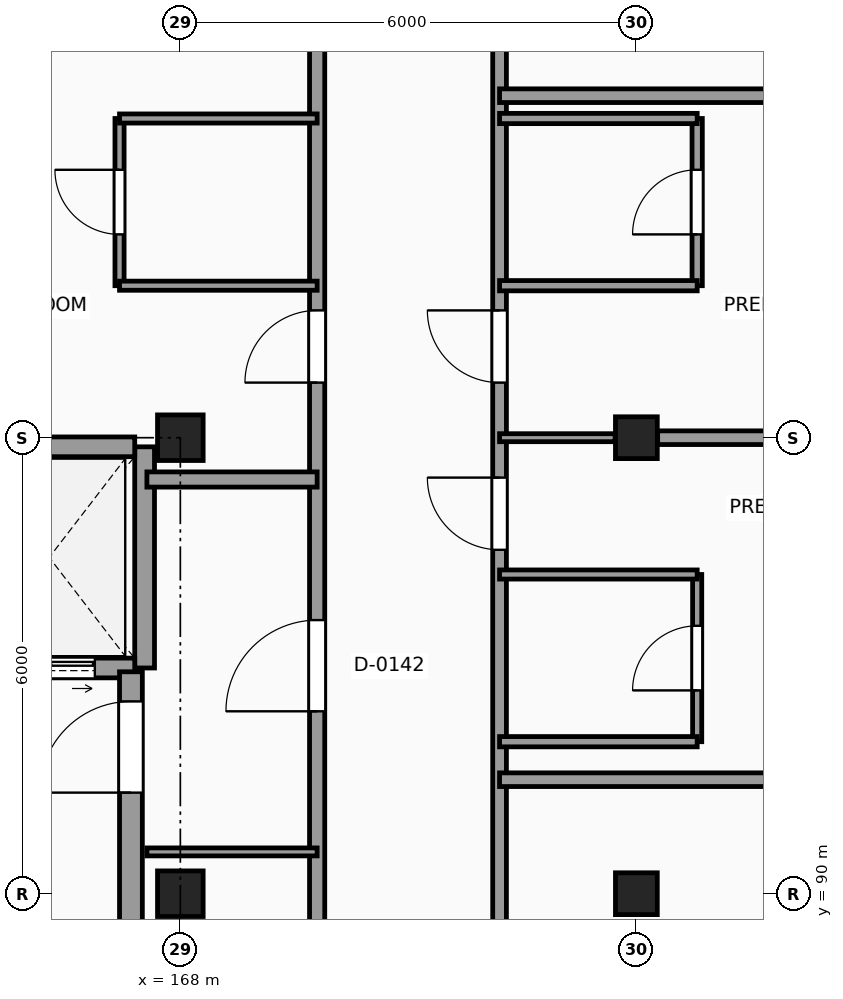
"""IFC4 building model, lengths in metres.
Left out: names, types, materials, properties, quantities, classifications, styles, units other than length and angle.
Written with IfcOpenShell. Run it as: python <this file> out.ifc"""

import sys

from ifc_helpers import new_model, si_unit, direction, frame, frame_2d, origin, origin_2d, place, context, subcontext, project, spatial, rectangle, extrude, element, fill, save


model = new_model("IFC4")
c1 = context("Model", 3, precision=1e-05, world=origin(), true_north=direction((0.0, 1.0)))
c2 = subcontext(c1, "Body", "Model", "MODEL_VIEW")
j1 = project(units=[si_unit("LENGTHUNIT", "METRE"), si_unit("PLANEANGLEUNIT", "RADIAN")], contexts=[c1])
p1 = place(None, origin())
s1 = spatial("IfcSite", under=j1, at=p1, CompositionType="ELEMENT")
p2 = place(p1, origin())
s2 = spatial("IfcBuilding", under=s1, at=p2, CompositionType="ELEMENT")
p3 = place(p2, frame((0.0, 0.0, 24.6)))
s3 = spatial("IfcBuildingStorey", under=s2, at=p3, CompositionType="ELEMENT", Elevation=24.6)
for number, where, z_axis, x_axis in (
    (1, (168.0, 90.0, 0.0), (0.0, 0.0, 1.0), (1.0, 0.0, 0.0)),
    (2, (168.0, 96.0, 0.0), (0.0, 0.0, 1.0), (1.0, 0.0, 0.0)),
):
    element("IfcColumn", number, at=place(p3, frame(where, z_axis=z_axis, x_axis=x_axis)), inside=s3, PredefinedType="COLUMN", context=c2, shape_type="SweptSolid", body=[
        extrude(rectangle(XDim=0.6, YDim=0.6, at=origin_2d()), origin(), (0.0, 0.0, 1.0), 3.6),
    ])
for number, where, z_axis, x_axis in (
    (3, (174.0, 90.0, 0.0), (0.0, 0.0, 1.0), (1.0, 0.0, 0.0)),
    (4, (174.0, 96.0, 0.0), (0.0, 0.0, 1.0), (1.0, 0.0, 0.0)),
):
    element("IfcColumn", number, at=place(p3, frame(where, z_axis=z_axis, x_axis=x_axis)), inside=s3, PredefinedType="COLUMN", context=c2, shape_type="SweptSolid", body=[
        extrude(rectangle(XDim=0.55, YDim=0.55, at=origin_2d()), origin(), (0.0, 0.0, 1.0), 3.6),
    ])
p4 = place(p3, frame((167.53, 92.97, 0.0), z_axis=(0.0, 0.0, 1.0), x_axis=(0.0, 1.0, 0.0)))
e5 = element("IfcWall", 5, at=p4, inside=s3, PredefinedType="SHEAR", context=c2, shape_type="SweptSolid", body=[
    extrude(rectangle(XDim=2.91, YDim=0.26, at=frame_2d((1.455, 0.0))), origin(), (0.0, 0.0, 1.0), 3.6),
])
p5 = place(p3, frame((165.15, 95.88, 0.0), z_axis=(0.0, 0.0, 1.0), x_axis=(1.0, 0.0, 0.0)))
e6 = element("IfcWall", 6, at=p5, inside=s3, PredefinedType="SHEAR", context=c2, shape_type="SweptSolid", body=[
    extrude(rectangle(XDim=2.25, YDim=0.26, at=frame_2d((1.125, 0.0))), origin(), (0.0, 0.0, 1.0), 3.6),
])
p6 = place(p3, frame((165.15, 92.97, 0.0), z_axis=(0.0, 0.0, 1.0), x_axis=(1.0, 0.0, 0.0)))
e7 = element("IfcWall", 7, at=p6, inside=s3, PredefinedType="SHEAR", context=c2, shape_type="SweptSolid", body=[
    extrude(rectangle(XDim=2.25, YDim=0.26, at=frame_2d((1.125, 0.0))), origin(), (0.0, 0.0, 1.0), 3.6),
])
p7 = place(p6, frame((0.525, 0.0, 0.0)))
e8 = element("IfcOpeningElement", 8, at=p7, cuts=e7, PredefinedType="OPENING", context=c2, shape_type="SweptSolid", body=[
    extrude(rectangle(XDim=1.2, YDim=2.25, at=frame_2d((0.6, 1.125))), frame((0.0, 0.14, 0.0), z_axis=(0.0, -1.0, 0.0), x_axis=(1.0, 0.0, 0.0)), (0.0, 0.0, 1.0), 0.28),
])
p8 = place(p3, frame((167.35, 88.68, 0.0), z_axis=(0.0, 0.0, 1.0), x_axis=(0.0, 1.0, 0.0)))
e9 = element("IfcWall", 9, at=p8, inside=s3, PredefinedType="SHEAR", context=c2, shape_type="SweptSolid", body=[
    extrude(rectangle(XDim=4.24, YDim=0.3, at=frame_2d((2.12, 0.0))), origin(), (0.0, 0.0, 1.0), 3.6),
])
p9 = place(p8, frame((2.65, 0.0, 0.0)))
e10 = element("IfcOpeningElement", 10, at=p9, cuts=e9, PredefinedType="OPENING", context=c2, shape_type="SweptSolid", body=[
    extrude(rectangle(XDim=1.2, YDim=2.2, at=frame_2d((0.6, 1.1))), frame((0.0, 0.16, 0.0), z_axis=(0.0, -1.0, 0.0), x_axis=(1.0, 0.0, 0.0)), (0.0, 0.0, 1.0), 0.32),
])
p10 = place(p3, frame((167.2, 98.0, 0.0), z_axis=(0.0, 0.0, 1.0), x_axis=(0.0, 1.0, 0.0)))
e11 = element("IfcWall", 11, at=p10, inside=s3, PredefinedType="PARTITIONING", context=c2, shape_type="SweptSolid", body=[
    extrude(rectangle(XDim=2.2, YDim=0.12, at=frame_2d((1.1, 0.0))), origin(), (0.0, 0.0, 1.0), 3.38),
])
p11 = place(p10, frame((0.675, 0.0, 0.0)))
e12 = element("IfcOpeningElement", 12, at=p11, cuts=e11, PredefinedType="OPENING", context=c2, shape_type="SweptSolid", body=[
    extrude(rectangle(XDim=0.85, YDim=2.1, at=frame_2d((0.425, 1.05))), frame((0.0, 0.07, 0.0), z_axis=(0.0, -1.0, 0.0), x_axis=(1.0, 0.0, 0.0)), (0.0, 0.0, 1.0), 0.14),
])
p12 = place(p3, frame((169.8, 42.215, 0.0), z_axis=(0.0, 0.0, 1.0), x_axis=(0.0, 1.0, 0.0)))
e13 = element("IfcWall", 13, at=p12, inside=s3, PredefinedType="PARTITIONING", context=c2, shape_type="SweptSolid", body=[
    extrude(rectangle(XDim=65.605, YDim=0.2, at=frame_2d((32.802, 0.0))), origin(), (0.0, 0.0, 1.0), 3.38),
])
p13 = place(p12, frame((50.185, 0.0, 0.0)))
e14 = element("IfcOpeningElement", 14, at=p13, cuts=e13, PredefinedType="OPENING", context=c2, shape_type="SweptSolid", body=[
    extrude(rectangle(XDim=1.2, YDim=2.2, at=frame_2d((0.6, 1.1))), frame((0.0, 0.11, 0.0), z_axis=(0.0, -1.0, 0.0), x_axis=(1.0, 0.0, 0.0)), (0.0, 0.0, 1.0), 0.22),
])
p14 = place(p12, frame((0.46, 0.0, 0.0)))
e15 = element("IfcOpeningElement", 15, at=p14, cuts=e13, PredefinedType="OPENING", context=c2, shape_type="SweptSolid", body=[
    extrude(rectangle(XDim=0.95, YDim=2.1, at=frame_2d((0.475, 1.05))), frame((0.0, 0.11, 0.0), z_axis=(0.0, -1.0, 0.0), x_axis=(1.0, 0.0, 0.0)), (0.0, 0.0, 1.0), 0.22),
])
p15 = place(p12, frame((6.51, 0.0, 0.0)))
e16 = element("IfcOpeningElement", 16, at=p15, cuts=e13, PredefinedType="OPENING", context=c2, shape_type="SweptSolid", body=[
    extrude(rectangle(XDim=0.95, YDim=2.1, at=frame_2d((0.475, 1.05))), frame((0.0, 0.11, 0.0), z_axis=(0.0, -1.0, 0.0), x_axis=(1.0, 0.0, 0.0)), (0.0, 0.0, 1.0), 0.22),
])
p16 = place(p12, frame((12.51, 0.0, 0.0)))
e17 = element("IfcOpeningElement", 17, at=p16, cuts=e13, PredefinedType="OPENING", context=c2, shape_type="SweptSolid", body=[
    extrude(rectangle(XDim=0.95, YDim=2.1, at=frame_2d((0.475, 1.05))), frame((0.0, 0.11, 0.0), z_axis=(0.0, -1.0, 0.0), x_axis=(1.0, 0.0, 0.0)), (0.0, 0.0, 1.0), 0.22),
])
p17 = place(p12, frame((18.51, 0.0, 0.0)))
e18 = element("IfcOpeningElement", 18, at=p17, cuts=e13, PredefinedType="OPENING", context=c2, shape_type="SweptSolid", body=[
    extrude(rectangle(XDim=0.95, YDim=2.1, at=frame_2d((0.475, 1.05))), frame((0.0, 0.11, 0.0), z_axis=(0.0, -1.0, 0.0), x_axis=(1.0, 0.0, 0.0)), (0.0, 0.0, 1.0), 0.22),
])
p18 = place(p12, frame((24.51, 0.0, 0.0)))
e19 = element("IfcOpeningElement", 19, at=p18, cuts=e13, PredefinedType="OPENING", context=c2, shape_type="SweptSolid", body=[
    extrude(rectangle(XDim=0.95, YDim=2.1, at=frame_2d((0.475, 1.05))), frame((0.0, 0.11, 0.0), z_axis=(0.0, -1.0, 0.0), x_axis=(1.0, 0.0, 0.0)), (0.0, 0.0, 1.0), 0.22),
])
p19 = place(p12, frame((30.51, 0.0, 0.0)))
e20 = element("IfcOpeningElement", 20, at=p19, cuts=e13, PredefinedType="OPENING", context=c2, shape_type="SweptSolid", body=[
    extrude(rectangle(XDim=0.95, YDim=2.1, at=frame_2d((0.475, 1.05))), frame((0.0, 0.11, 0.0), z_axis=(0.0, -1.0, 0.0), x_axis=(1.0, 0.0, 0.0)), (0.0, 0.0, 1.0), 0.22),
])
p20 = place(p12, frame((54.51, 0.0, 0.0)))
e21 = element("IfcOpeningElement", 21, at=p20, cuts=e13, PredefinedType="OPENING", context=c2, shape_type="SweptSolid", body=[
    extrude(rectangle(XDim=0.95, YDim=2.1, at=frame_2d((0.475, 1.05))), frame((0.0, 0.11, 0.0), z_axis=(0.0, -1.0, 0.0), x_axis=(1.0, 0.0, 0.0)), (0.0, 0.0, 1.0), 0.22),
])
p21 = place(p12, frame((60.51, 0.0, 0.0)))
e22 = element("IfcOpeningElement", 22, at=p21, cuts=e13, PredefinedType="OPENING", context=c2, shape_type="SweptSolid", body=[
    extrude(rectangle(XDim=0.95, YDim=2.1, at=frame_2d((0.475, 1.05))), frame((0.0, 0.11, 0.0), z_axis=(0.0, -1.0, 0.0), x_axis=(1.0, 0.0, 0.0)), (0.0, 0.0, 1.0), 0.22),
])
p22 = place(p3, frame((172.2, 42.215, 0.0), z_axis=(0.0, 0.0, 1.0), x_axis=(0.0, 1.0, 0.0)))
e23 = element("IfcWall", 23, at=p22, inside=s3, PredefinedType="PARTITIONING", context=c2, shape_type="SweptSolid", body=[
    extrude(rectangle(XDim=65.605, YDim=0.18, at=frame_2d((32.802, 0.0))), origin(), (0.0, 0.0, 1.0), 3.38),
])
p23 = place(p22, frame((7.61, 0.0, 0.0)))
e24 = element("IfcOpeningElement", 24, at=p23, cuts=e23, PredefinedType="OPENING", context=c2, shape_type="SweptSolid", body=[
    extrude(rectangle(XDim=0.95, YDim=2.1, at=frame_2d((0.475, 1.05))), frame((0.0, 0.1, 0.0), z_axis=(0.0, -1.0, 0.0), x_axis=(1.0, 0.0, 0.0)), (0.0, 0.0, 1.0), 0.2),
])
p24 = place(p22, frame((12.11, 0.0, 0.0)))
e25 = element("IfcOpeningElement", 25, at=p24, cuts=e23, PredefinedType="OPENING", context=c2, shape_type="SweptSolid", body=[
    extrude(rectangle(XDim=0.95, YDim=2.1, at=frame_2d((0.475, 1.05))), frame((0.0, 0.1, 0.0), z_axis=(0.0, -1.0, 0.0), x_axis=(1.0, 0.0, 0.0)), (0.0, 0.0, 1.0), 0.2),
])
p25 = place(p22, frame((16.31, 0.0, 0.0)))
e26 = element("IfcOpeningElement", 26, at=p25, cuts=e23, PredefinedType="OPENING", context=c2, shape_type="SweptSolid", body=[
    extrude(rectangle(XDim=0.95, YDim=2.1, at=frame_2d((0.475, 1.05))), frame((0.0, 0.1, 0.0), z_axis=(0.0, -1.0, 0.0), x_axis=(1.0, 0.0, 0.0)), (0.0, 0.0, 1.0), 0.2),
])
p26 = place(p22, frame((25.61, 0.0, 0.0)))
e27 = element("IfcOpeningElement", 27, at=p26, cuts=e23, PredefinedType="OPENING", context=c2, shape_type="SweptSolid", body=[
    extrude(rectangle(XDim=0.95, YDim=2.1, at=frame_2d((0.475, 1.05))), frame((0.0, 0.1, 0.0), z_axis=(0.0, -1.0, 0.0), x_axis=(1.0, 0.0, 0.0)), (0.0, 0.0, 1.0), 0.2),
])
p27 = place(p22, frame((30.11, 0.0, 0.0)))
e28 = element("IfcOpeningElement", 28, at=p27, cuts=e23, PredefinedType="OPENING", context=c2, shape_type="SweptSolid", body=[
    extrude(rectangle(XDim=0.95, YDim=2.1, at=frame_2d((0.475, 1.05))), frame((0.0, 0.1, 0.0), z_axis=(0.0, -1.0, 0.0), x_axis=(1.0, 0.0, 0.0)), (0.0, 0.0, 1.0), 0.2),
])
p28 = place(p22, frame((34.31, 0.0, 0.0)))
e29 = element("IfcOpeningElement", 29, at=p28, cuts=e23, PredefinedType="OPENING", context=c2, shape_type="SweptSolid", body=[
    extrude(rectangle(XDim=0.95, YDim=2.1, at=frame_2d((0.475, 1.05))), frame((0.0, 0.1, 0.0), z_axis=(0.0, -1.0, 0.0), x_axis=(1.0, 0.0, 0.0)), (0.0, 0.0, 1.0), 0.2),
])
p29 = place(p22, frame((36.51, 0.0, 0.0)))
e30 = element("IfcOpeningElement", 30, at=p29, cuts=e23, PredefinedType="OPENING", context=c2, shape_type="SweptSolid", body=[
    extrude(rectangle(XDim=0.95, YDim=2.1, at=frame_2d((0.475, 1.05))), frame((0.0, 0.1, 0.0), z_axis=(0.0, -1.0, 0.0), x_axis=(1.0, 0.0, 0.0)), (0.0, 0.0, 1.0), 0.2),
])
p30 = place(p22, frame((42.51, 0.0, 0.0)))
e31 = element("IfcOpeningElement", 31, at=p30, cuts=e23, PredefinedType="OPENING", context=c2, shape_type="SweptSolid", body=[
    extrude(rectangle(XDim=0.95, YDim=2.1, at=frame_2d((0.475, 1.05))), frame((0.0, 0.1, 0.0), z_axis=(0.0, -1.0, 0.0), x_axis=(1.0, 0.0, 0.0)), (0.0, 0.0, 1.0), 0.2),
])
p31 = place(p22, frame((52.31, 0.0, 0.0)))
e32 = element("IfcOpeningElement", 32, at=p31, cuts=e23, PredefinedType="OPENING", context=c2, shape_type="SweptSolid", body=[
    extrude(rectangle(XDim=0.95, YDim=2.1, at=frame_2d((0.475, 1.05))), frame((0.0, 0.1, 0.0), z_axis=(0.0, -1.0, 0.0), x_axis=(1.0, 0.0, 0.0)), (0.0, 0.0, 1.0), 0.2),
])
p32 = place(p22, frame((54.51, 0.0, 0.0)))
e33 = element("IfcOpeningElement", 33, at=p32, cuts=e23, PredefinedType="OPENING", context=c2, shape_type="SweptSolid", body=[
    extrude(rectangle(XDim=0.95, YDim=2.1, at=frame_2d((0.475, 1.05))), frame((0.0, 0.1, 0.0), z_axis=(0.0, -1.0, 0.0), x_axis=(1.0, 0.0, 0.0)), (0.0, 0.0, 1.0), 0.2),
])
p33 = place(p22, frame((60.51, 0.0, 0.0)))
e34 = element("IfcOpeningElement", 34, at=p33, cuts=e23, PredefinedType="OPENING", context=c2, shape_type="SweptSolid", body=[
    extrude(rectangle(XDim=0.95, YDim=2.1, at=frame_2d((0.475, 1.05))), frame((0.0, 0.1, 0.0), z_axis=(0.0, -1.0, 0.0), x_axis=(1.0, 0.0, 0.0)), (0.0, 0.0, 1.0), 0.2),
])
p34 = place(p3, frame((174.8, 92.0, 0.0), z_axis=(0.0, 0.0, 1.0), x_axis=(0.0, 1.0, 0.0)))
e35 = element("IfcWall", 35, at=p34, inside=s3, PredefinedType="PARTITIONING", context=c2, shape_type="SweptSolid", body=[
    extrude(rectangle(XDim=2.2, YDim=0.12, at=frame_2d((1.1, 0.0))), origin(), (0.0, 0.0, 1.0), 3.38),
])
p35 = place(p34, frame((0.675, 0.0, 0.0)))
e36 = element("IfcOpeningElement", 36, at=p35, cuts=e35, PredefinedType="OPENING", context=c2, shape_type="SweptSolid", body=[
    extrude(rectangle(XDim=0.85, YDim=2.1, at=frame_2d((0.425, 1.05))), frame((0.0, 0.07, 0.0), z_axis=(0.0, -1.0, 0.0), x_axis=(1.0, 0.0, 0.0)), (0.0, 0.0, 1.0), 0.14),
])
p36 = place(p3, frame((174.8, 98.0, 0.0), z_axis=(0.0, 0.0, 1.0), x_axis=(0.0, 1.0, 0.0)))
e37 = element("IfcWall", 37, at=p36, inside=s3, PredefinedType="PARTITIONING", context=c2, shape_type="SweptSolid", body=[
    extrude(rectangle(XDim=2.2, YDim=0.135, at=frame_2d((1.1, 0.0))), origin(), (0.0, 0.0, 1.0), 3.38),
])
p37 = place(p36, frame((0.675, 0.0, 0.0)))
e38 = element("IfcOpeningElement", 38, at=p37, cuts=e37, PredefinedType="OPENING", context=c2, shape_type="SweptSolid", body=[
    extrude(rectangle(XDim=0.85, YDim=2.1, at=frame_2d((0.425, 1.05))), frame((0.0, 0.078, 0.0), z_axis=(0.0, -1.0, 0.0), x_axis=(1.0, 0.0, 0.0)), (0.0, 0.0, 1.0), 0.155),
])
p38 = place(p3, frame((167.56, 90.55, 0.0), z_axis=(0.0, 0.0, 1.0), x_axis=(1.0, 0.0, 0.0)))
e39 = element("IfcWall", 39, at=p38, inside=s3, PredefinedType="PARTITIONING", context=c2, shape_type="SweptSolid", body=[
    extrude(rectangle(XDim=2.24, YDim=0.105, at=frame_2d((1.12, 0.0))), origin(), (0.0, 0.0, 1.0), 3.38),
])
p39 = place(p3, frame((172.2, 91.5, 0.0), z_axis=(0.0, 0.0, 1.0), x_axis=(1.0, 0.0, 0.0)))
e40 = element("IfcWall", 40, at=p39, inside=s3, PredefinedType="PARTITIONING", context=c2, shape_type="SweptSolid", body=[
    extrude(rectangle(XDim=7.585, YDim=0.18, at=frame_2d((3.792, 0.0))), origin(), (0.0, 0.0, 1.0), 3.38),
])
p40 = place(p3, frame((172.2, 92.0, 0.0), z_axis=(0.0, 0.0, 1.0), x_axis=(1.0, 0.0, 0.0)))
e41 = element("IfcWall", 41, at=p40, inside=s3, PredefinedType="PARTITIONING", context=c2, shape_type="SweptSolid", body=[
    extrude(rectangle(XDim=2.6, YDim=0.135, at=frame_2d((1.3, 0.0))), origin(), (0.0, 0.0, 1.0), 3.38),
])
p41 = place(p3, frame((172.2, 94.2, 0.0), z_axis=(0.0, 0.0, 1.0), x_axis=(1.0, 0.0, 0.0)))
e42 = element("IfcWall", 42, at=p41, inside=s3, PredefinedType="PARTITIONING", context=c2, shape_type="SweptSolid", body=[
    extrude(rectangle(XDim=2.6, YDim=0.12, at=frame_2d((1.3, 0.0))), origin(), (0.0, 0.0, 1.0), 3.38),
])
p42 = place(p3, frame((167.56, 95.45, 0.0), z_axis=(0.0, 0.0, 1.0), x_axis=(1.0, 0.0, 0.0)))
e43 = element("IfcWall", 43, at=p42, inside=s3, PredefinedType="PARTITIONING", context=c2, shape_type="SweptSolid", body=[
    extrude(rectangle(XDim=2.24, YDim=0.2, at=frame_2d((1.12, 0.0))), origin(), (0.0, 0.0, 1.0), 3.38),
])
p43 = place(p3, frame((172.2, 96.0, 0.0), z_axis=(0.0, 0.0, 1.0), x_axis=(1.0, 0.0, 0.0)))
e44 = element("IfcWall", 44, at=p43, inside=s3, PredefinedType="PARTITIONING", context=c2, shape_type="SweptSolid", body=[
    extrude(rectangle(XDim=1.52, YDim=0.105, at=frame_2d((0.76, 0.0))), origin(), (0.0, 0.0, 1.0), 3.09),
])
p44 = place(p3, frame((174.28, 96.0, 0.0), z_axis=(0.0, 0.0, 1.0), x_axis=(1.0, 0.0, 0.0)))
e45 = element("IfcWall", 45, at=p44, inside=s3, PredefinedType="PARTITIONING", context=c2, shape_type="SweptSolid", body=[
    extrude(rectangle(XDim=5.415, YDim=0.18, at=frame_2d((2.708, 0.0))), origin(), (0.0, 0.0, 1.0), 2.58),
])
p45 = place(p3, frame((167.2, 98.0, 0.0), z_axis=(0.0, 0.0, 1.0), x_axis=(1.0, 0.0, 0.0)))
e46 = element("IfcWall", 46, at=p45, inside=s3, PredefinedType="PARTITIONING", context=c2, shape_type="SweptSolid", body=[
    extrude(rectangle(XDim=2.6, YDim=0.12, at=frame_2d((1.3, 0.0))), origin(), (0.0, 0.0, 1.0), 3.38),
])
p46 = place(p3, frame((172.2, 98.0, 0.0), z_axis=(0.0, 0.0, 1.0), x_axis=(1.0, 0.0, 0.0)))
e47 = element("IfcWall", 47, at=p46, inside=s3, PredefinedType="PARTITIONING", context=c2, shape_type="SweptSolid", body=[
    extrude(rectangle(XDim=2.6, YDim=0.135, at=frame_2d((1.3, 0.0))), origin(), (0.0, 0.0, 1.0), 3.38),
])
p47 = place(p3, frame((167.2, 100.2, 0.0), z_axis=(0.0, 0.0, 1.0), x_axis=(1.0, 0.0, 0.0)))
e48 = element("IfcWall", 48, at=p47, inside=s3, PredefinedType="PARTITIONING", context=c2, shape_type="SweptSolid", body=[
    extrude(rectangle(XDim=2.6, YDim=0.12, at=frame_2d((1.3, 0.0))), origin(), (0.0, 0.0, 1.0), 3.38),
])
p48 = place(p3, frame((172.2, 100.2, 0.0), z_axis=(0.0, 0.0, 1.0), x_axis=(1.0, 0.0, 0.0)))
e49 = element("IfcWall", 49, at=p48, inside=s3, PredefinedType="PARTITIONING", context=c2, shape_type="SweptSolid", body=[
    extrude(rectangle(XDim=2.6, YDim=0.135, at=frame_2d((1.3, 0.0))), origin(), (0.0, 0.0, 1.0), 3.38),
])
p49 = place(p3, frame((172.2, 100.5, 0.0), z_axis=(0.0, 0.0, 1.0), x_axis=(1.0, 0.0, 0.0)))
e50 = element("IfcWall", 50, at=p49, inside=s3, PredefinedType="PARTITIONING", context=c2, shape_type="SweptSolid", body=[
    extrude(rectangle(XDim=7.525, YDim=0.18, at=frame_2d((3.763, 0.0))), origin(), (0.0, 0.0, 1.0), 3.38),
])
p50 = place(p7, origin())
e51 = element("IfcDoor", 51, at=p50, inside=s3, OperationType="DOUBLE_DOOR_SLIDING", PredefinedType="DOOR", context=c2, shape_type="SweptSolid", body=[
    extrude(rectangle(XDim=1.2, YDim=2.25, at=frame_2d((0.6, 1.125))), frame((0.0, 0.025, 0.0), z_axis=(0.0, -1.0, 0.0), x_axis=(1.0, 0.0, 0.0)), (0.0, 0.0, 1.0), 0.05),
])
fill(e8, e51)
p51 = place(p9, origin())
e52 = element("IfcDoor", 52, at=p51, inside=s3, OperationType="SINGLE_SWING_LEFT", PredefinedType="DOOR", context=c2, shape_type="SweptSolid", body=[
    extrude(rectangle(XDim=1.2, YDim=2.2, at=frame_2d((0.6, 1.1))), frame((0.0, 0.025, 0.0), z_axis=(0.0, -1.0, 0.0), x_axis=(1.0, 0.0, 0.0)), (0.0, 0.0, 1.0), 0.05),
])
fill(e10, e52)
p52 = place(p13, origin())
e53 = element("IfcDoor", 53, at=p52, inside=s3, OperationType="SINGLE_SWING_LEFT", PredefinedType="DOOR", context=c2, shape_type="SweptSolid", body=[
    extrude(rectangle(XDim=1.2, YDim=2.2, at=frame_2d((0.6, 1.1))), frame((0.0, 0.025, 0.0), z_axis=(0.0, -1.0, 0.0), x_axis=(1.0, 0.0, 0.0)), (0.0, 0.0, 1.0), 0.05),
])
fill(e14, e53)
p53 = place(p35, origin())
e54 = element("IfcDoor", 54, at=p53, inside=s3, OperationType="SINGLE_SWING_LEFT", PredefinedType="DOOR", context=c2, shape_type="SweptSolid", body=[
    extrude(rectangle(XDim=0.85, YDim=2.1, at=frame_2d((0.425, 1.05))), frame((0.0, 0.025, 0.0), z_axis=(0.0, -1.0, 0.0), x_axis=(1.0, 0.0, 0.0)), (0.0, 0.0, 1.0), 0.05),
])
fill(e36, e54)
p54 = place(p31, origin())
e55 = element("IfcDoor", 55, at=p54, inside=s3, OperationType="SINGLE_SWING_RIGHT", PredefinedType="DOOR", context=c2, shape_type="SweptSolid", body=[
    extrude(rectangle(XDim=0.95, YDim=2.1, at=frame_2d((0.475, 1.05))), frame((0.0, 0.025, 0.0), z_axis=(0.0, -1.0, 0.0), x_axis=(1.0, 0.0, 0.0)), (0.0, 0.0, 1.0), 0.05),
])
fill(e32, e55)
p55 = place(p37, origin())
e56 = element("IfcDoor", 56, at=p55, inside=s3, OperationType="SINGLE_SWING_LEFT", PredefinedType="DOOR", context=c2, shape_type="SweptSolid", body=[
    extrude(rectangle(XDim=0.85, YDim=2.1, at=frame_2d((0.425, 1.05))), frame((0.0, 0.025, 0.0), z_axis=(0.0, -1.0, 0.0), x_axis=(1.0, 0.0, 0.0)), (0.0, 0.0, 1.0), 0.05),
])
fill(e38, e56)
p56 = place(p32, origin())
e57 = element("IfcDoor", 57, at=p56, inside=s3, OperationType="SINGLE_SWING_RIGHT", PredefinedType="DOOR", context=c2, shape_type="SweptSolid", body=[
    extrude(rectangle(XDim=0.95, YDim=2.1, at=frame_2d((0.475, 1.05))), frame((0.0, 0.025, 0.0), z_axis=(0.0, -1.0, 0.0), x_axis=(1.0, 0.0, 0.0)), (0.0, 0.0, 1.0), 0.05),
])
fill(e33, e57)
p57 = place(p11, origin())
e58 = element("IfcDoor", 58, at=p57, inside=s3, OperationType="SINGLE_SWING_RIGHT", PredefinedType="DOOR", context=c2, shape_type="SweptSolid", body=[
    extrude(rectangle(XDim=0.85, YDim=2.1, at=frame_2d((0.425, 1.05))), frame((0.0, 0.025, 0.0), z_axis=(0.0, -1.0, 0.0), x_axis=(1.0, 0.0, 0.0)), (0.0, 0.0, 1.0), 0.05),
])
fill(e12, e58)
p58 = place(p20, origin())
e59 = element("IfcDoor", 59, at=p58, inside=s3, OperationType="SINGLE_SWING_LEFT", PredefinedType="DOOR", context=c2, shape_type="SweptSolid", body=[
    extrude(rectangle(XDim=0.95, YDim=2.1, at=frame_2d((0.475, 1.05))), frame((0.0, 0.025, 0.0), z_axis=(0.0, -1.0, 0.0), x_axis=(1.0, 0.0, 0.0)), (0.0, 0.0, 1.0), 0.05),
])
fill(e21, e59)
save(model, sys.argv[1])
